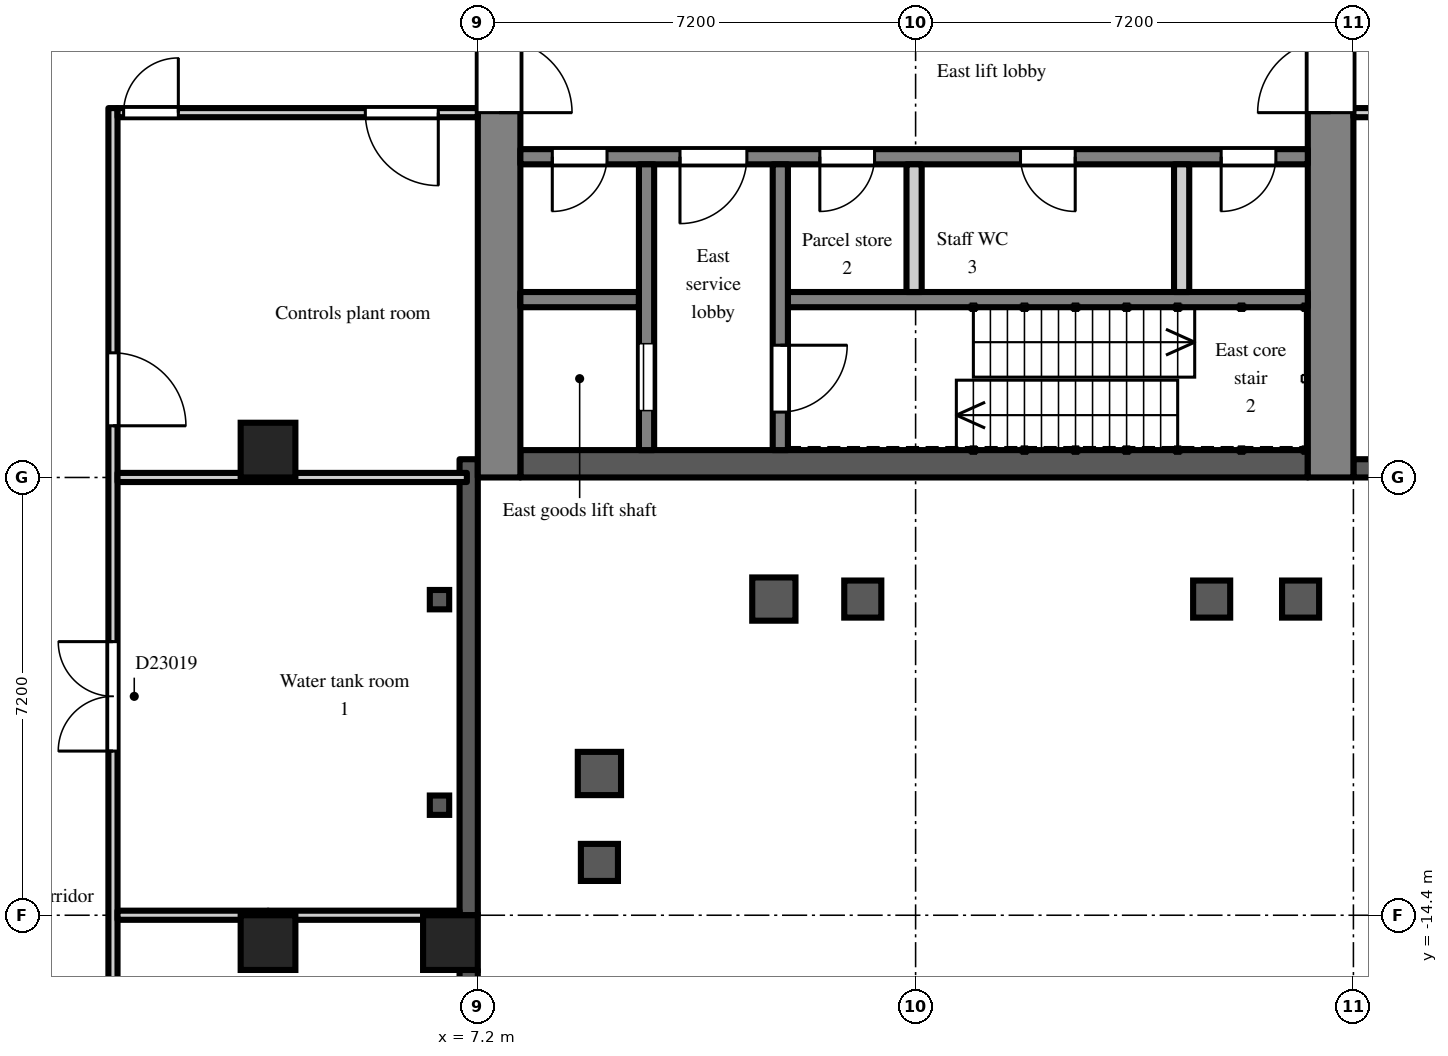
"""IFC4 building model, lengths in metres.
Left out: names, types, materials, properties, quantities, classifications, styles, units other than length and angle.
Written with IfcOpenShell. Run it as: python <this file> out.ifc"""

import sys

from ifc_helpers import new_model, si_unit, direction, frame, frame_2d, origin, origin_2d, place, context, subcontext, project, spatial, polyline, rectangle, outline, extrude, element, fill, save


model = new_model("IFC4")
c1 = context("Model", 3, precision=1e-05, world=origin(), true_north=direction((0.0, 1.0)))
c2 = subcontext(c1, "Body", "Model", "MODEL_VIEW")
j1 = project(units=[si_unit("LENGTHUNIT", "METRE"), si_unit("PLANEANGLEUNIT", "RADIAN")], contexts=[c1])
p1 = place(None, origin())
s1 = spatial("IfcSite", under=j1, at=p1, CompositionType="ELEMENT")
p2 = place(p1, origin())
s2 = spatial("IfcBuilding", under=s1, at=p2, CompositionType="ELEMENT")
p3 = place(p2, frame((0.0, 0.0, 162.3)))
s3 = spatial("IfcBuildingStorey", under=s2, at=p3, CompositionType="ELEMENT", Elevation=162.3)
for number, where, z_axis, x_axis in (
    (1, (3.75, -14.85, 0.0), (0.0, 0.0, 1.0), (1.0, 0.0, 0.0)),
    (2, (3.75, -6.75, 0.0), (0.0, 0.0, 1.0), (1.0, 0.0, 0.0)),
    (3, (6.75, -14.85, 0.0), (0.0, 0.0, 1.0), (1.0, 0.0, 0.0)),
):
    element("IfcColumn", number, at=place(p3, frame(where, z_axis=z_axis, x_axis=x_axis)), inside=s3, PredefinedType="COLUMN", context=c2, shape_type="SweptSolid", body=[
        extrude(rectangle(XDim=0.9, YDim=0.9, at=origin_2d()), origin(), (0.0, 0.0, 1.0), 4.2),
    ])
p4 = place(p3, frame((21.6, -7.05, 0.0), z_axis=(0.0, 0.0, 1.0), x_axis=(1.0, 0.0, 0.0)))
e4 = element("IfcWall", 4, at=p4, inside=s3, PredefinedType="SOLIDWALL", context=c2, shape_type="SweptSolid", body=[
    extrude(rectangle(XDim=2.7, YDim=0.3, at=frame_2d((1.35, 0.0))), origin(), (0.0, 0.0, 1.0), 3.4),
])
p5 = place(p3, frame((7.05, -17.1, 0.0), z_axis=(0.0, 0.0, 1.0), x_axis=(0.0, 1.0, 0.0)))
e5 = element("IfcWall", 5, at=p5, inside=s3, PredefinedType="SOLIDWALL", context=c2, shape_type="SweptSolid", body=[
    extrude(rectangle(XDim=1.8, YDim=0.3, at=frame_2d((0.9, 0.0))), origin(), (0.0, 0.0, 1.0), 3.4),
])
p6 = place(p3, frame((7.05, -14.4, 0.0), z_axis=(0.0, 0.0, 1.0), x_axis=(0.0, 1.0, 0.0)))
e6 = element("IfcWall", 6, at=p6, inside=s3, PredefinedType="SOLIDWALL", context=c2, shape_type="SweptSolid", body=[
    extrude(rectangle(XDim=7.5, YDim=0.3, at=frame_2d((3.75, 0.0))), origin(), (0.0, 0.0, 1.0), 3.8),
])
p7 = place(p3, frame((7.55, -7.2, 0.0), z_axis=(0.0, 0.0, 1.0), x_axis=(0.0, 1.0, 0.0)))
e7 = element("IfcWall", 7, at=p7, inside=s3, PredefinedType="SHEAR", context=c2, shape_type="SweptSolid", body=[
    extrude(rectangle(XDim=14.4, YDim=0.7, at=frame_2d((7.2, 0.0))), origin(), (0.0, 0.0, 1.0), 3.8),
])
p8 = place(p7, frame((6.0, 0.0, 0.0)))
e8 = element("IfcOpeningElement", 8, at=p8, cuts=e7, PredefinedType="OPENING", context=c2, shape_type="SweptSolid", body=[
    extrude(rectangle(XDim=2.4, YDim=2.2, at=frame_2d((1.2, 1.1))), frame((0.0, 0.36, 0.0), z_axis=(0.0, -1.0, 0.0), x_axis=(1.0, 0.0, 0.0)), (0.0, 0.0, 1.0), 0.72),
])
p9 = place(p3, frame((21.225, -7.2, 0.0), z_axis=(0.0, 0.0, 1.0), x_axis=(0.0, 1.0, 0.0)))
e9 = element("IfcWall", 9, at=p9, inside=s3, PredefinedType="SHEAR", context=c2, shape_type="SweptSolid", body=[
    extrude(rectangle(XDim=14.4, YDim=0.75, at=frame_2d((7.2, 0.0))), origin(), (0.0, 0.0, 1.0), 3.8),
])
p10 = place(p9, frame((6.0, 0.0, 0.0)))
e10 = element("IfcOpeningElement", 10, at=p10, cuts=e9, PredefinedType="OPENING", context=c2, shape_type="SweptSolid", body=[
    extrude(rectangle(XDim=2.4, YDim=2.2, at=frame_2d((1.2, 1.1))), frame((0.0, 0.385, 0.0), z_axis=(0.0, -1.0, 0.0), x_axis=(1.0, 0.0, 0.0)), (0.0, 0.0, 1.0), 0.77),
])
p11 = place(p3, frame((7.9, -6.975, 0.0), z_axis=(0.0, 0.0, 1.0), x_axis=(1.0, 0.0, 0.0)))
e11 = element("IfcWall", 11, at=p11, inside=s3, PredefinedType="SHEAR", context=c2, shape_type="SweptSolid", body=[
    extrude(rectangle(XDim=12.95, YDim=0.45, at=frame_2d((6.475, 0.0))), origin(), (0.0, 0.0, 1.0), 3.8),
])
p12 = place(p3, frame((7.9, -1.925, 0.0), z_axis=(0.0, 0.0, 1.0), x_axis=(1.0, 0.0, 0.0)))
e12 = element("IfcWall", 12, at=p12, inside=s3, PredefinedType="SHEAR", context=c2, shape_type="SweptSolid", body=[
    extrude(rectangle(XDim=12.95, YDim=0.25, at=frame_2d((6.475, 0.0))), origin(), (0.0, 0.0, 1.0), 3.8),
])
p13 = place(p12, frame((0.525, 0.0, 0.0)))
e13 = element("IfcOpeningElement", 13, at=p13, cuts=e12, PredefinedType="OPENING", context=c2, shape_type="SweptSolid", body=[
    extrude(rectangle(XDim=0.9, YDim=2.1, at=frame_2d((0.45, 1.05))), frame((0.0, 0.135, 0.0), z_axis=(0.0, -1.0, 0.0), x_axis=(1.0, 0.0, 0.0)), (0.0, 0.0, 1.0), 0.27),
])
p14 = place(p12, frame((2.625, 0.0, 0.0)))
e14 = element("IfcOpeningElement", 14, at=p14, cuts=e12, PredefinedType="OPENING", context=c2, shape_type="SweptSolid", body=[
    extrude(rectangle(XDim=1.1, YDim=2.1, at=frame_2d((0.55, 1.05))), frame((0.0, 0.135, 0.0), z_axis=(0.0, -1.0, 0.0), x_axis=(1.0, 0.0, 0.0)), (0.0, 0.0, 1.0), 0.27),
])
p15 = place(p12, frame((4.925, 0.0, 0.0)))
e15 = element("IfcOpeningElement", 15, at=p15, cuts=e12, PredefinedType="OPENING", context=c2, shape_type="SweptSolid", body=[
    extrude(rectangle(XDim=0.9, YDim=2.1, at=frame_2d((0.45, 1.05))), frame((0.0, 0.135, 0.0), z_axis=(0.0, -1.0, 0.0), x_axis=(1.0, 0.0, 0.0)), (0.0, 0.0, 1.0), 0.27),
])
p16 = place(p12, frame((8.225, 0.0, 0.0)))
e16 = element("IfcOpeningElement", 16, at=p16, cuts=e12, PredefinedType="OPENING", context=c2, shape_type="SweptSolid", body=[
    extrude(rectangle(XDim=0.9, YDim=2.1, at=frame_2d((0.45, 1.05))), frame((0.0, 0.135, 0.0), z_axis=(0.0, -1.0, 0.0), x_axis=(1.0, 0.0, 0.0)), (0.0, 0.0, 1.0), 0.27),
])
p17 = place(p12, frame((11.525, 0.0, 0.0)))
e17 = element("IfcOpeningElement", 17, at=p17, cuts=e12, PredefinedType="OPENING", context=c2, shape_type="SweptSolid", body=[
    extrude(rectangle(XDim=0.9, YDim=2.1, at=frame_2d((0.45, 1.05))), frame((0.0, 0.135, 0.0), z_axis=(0.0, -1.0, 0.0), x_axis=(1.0, 0.0, 0.0)), (0.0, 0.0, 1.0), 0.27),
])
p18 = place(p3, frame((7.9, -4.275, 0.0), z_axis=(0.0, 0.0, 1.0), x_axis=(1.0, 0.0, 0.0)))
e18 = element("IfcWall", 18, at=p18, inside=s3, PredefinedType="SHEAR", context=c2, shape_type="SweptSolid", body=[
    extrude(rectangle(XDim=1.95, YDim=0.25, at=frame_2d((0.975, 0.0))), origin(), (0.0, 0.0, 1.0), 3.8),
])
p19 = place(p3, frame((12.3, -4.275, 0.0), z_axis=(0.0, 0.0, 1.0), x_axis=(1.0, 0.0, 0.0)))
e19 = element("IfcWall", 19, at=p19, inside=s3, PredefinedType="SHEAR", context=c2, shape_type="SweptSolid", body=[
    extrude(rectangle(XDim=8.55, YDim=0.25, at=frame_2d((4.275, 0.0))), origin(), (0.0, 0.0, 1.0), 3.8),
])
p20 = place(p3, frame((9.975, -2.05, 0.0), z_axis=(0.0, 0.0, 1.0), x_axis=(0.0, -1.0, 0.0)))
e20 = element("IfcWall", 20, at=p20, inside=s3, PredefinedType="SHEAR", context=c2, shape_type="SweptSolid", body=[
    extrude(rectangle(XDim=4.7, YDim=0.25, at=frame_2d((2.35, 0.0))), origin(), (0.0, 0.0, 1.0), 3.8),
])
p21 = place(p20, frame((2.95, 0.0, 0.0)))
e21 = element("IfcOpeningElement", 21, at=p21, cuts=e20, PredefinedType="OPENING", context=c2, shape_type="SweptSolid", body=[
    extrude(rectangle(XDim=1.1, YDim=2.1, at=frame_2d((0.55, 1.05))), frame((0.0, 0.135, 0.0), z_axis=(0.0, -1.0, 0.0), x_axis=(1.0, 0.0, 0.0)), (0.0, 0.0, 1.0), 0.27),
])
p22 = place(p3, frame((12.175, -2.05, 0.0), z_axis=(0.0, 0.0, 1.0), x_axis=(0.0, -1.0, 0.0)))
e22 = element("IfcWall", 22, at=p22, inside=s3, PredefinedType="SHEAR", context=c2, shape_type="SweptSolid", body=[
    extrude(rectangle(XDim=4.7, YDim=0.25, at=frame_2d((2.35, 0.0))), origin(), (0.0, 0.0, 1.0), 3.8),
])
p23 = place(p22, frame((2.975, 0.0, 0.0)))
e23 = element("IfcOpeningElement", 23, at=p23, cuts=e22, PredefinedType="OPENING", context=c2, shape_type="SweptSolid", body=[
    extrude(rectangle(XDim=1.1, YDim=2.1, at=frame_2d((0.55, 1.05))), frame((0.0, 0.135, 0.0), z_axis=(0.0, -1.0, 0.0), x_axis=(1.0, 0.0, 0.0)), (0.0, 0.0, 1.0), 0.27),
])
for number, where, z_axis, x_axis in (
    (24, (14.375, -2.05, 0.0), (0.0, 0.0, 1.0), (0.0, -1.0, 0.0)),
    (25, (18.775, -2.05, 0.0), (0.0, 0.0, 1.0), (0.0, -1.0, 0.0)),
):
    element("IfcWall", number, at=place(p3, frame(where, z_axis=z_axis, x_axis=x_axis)), inside=s3, PredefinedType="PARTITIONING", context=c2, shape_type="SweptSolid", body=[
        extrude(rectangle(XDim=2.1, YDim=0.25, at=frame_2d((1.05, 0.0))), origin(), (0.0, 0.0, 1.0), 3.8),
    ])
p24 = place(p3, frame((1.2, -21.42, 0.0), z_axis=(0.0, 0.0, 1.0), x_axis=(0.0, 1.0, 0.0)))
e26 = element("IfcWall", 26, at=p24, inside=s3, PredefinedType="PARTITIONING", context=c2, shape_type="SweptSolid", body=[
    extrude(rectangle(XDim=20.295, YDim=0.15, at=frame_2d((10.147, 0.0))), origin(), (0.0, 0.0, 1.0), 3.8),
])
p25 = place(p24, frame((15.07, 0.0, 0.0)))
e27 = element("IfcOpeningElement", 27, at=p25, cuts=e26, PredefinedType="OPENING", context=c2, shape_type="SweptSolid", body=[
    extrude(rectangle(XDim=1.2, YDim=2.1, at=frame_2d((0.6, 1.05))), frame((0.0, 0.085, 0.0), z_axis=(0.0, -1.0, 0.0), x_axis=(1.0, 0.0, 0.0)), (0.0, 0.0, 1.0), 0.17),
])
p26 = place(p24, frame((9.72, 0.0, 0.0)))
e28 = element("IfcOpeningElement", 28, at=p26, cuts=e26, PredefinedType="OPENING", context=c2, shape_type="SweptSolid", body=[
    extrude(rectangle(XDim=1.8, YDim=2.1, at=frame_2d((0.9, 1.05))), frame((0.0, 0.085, 0.0), z_axis=(0.0, -1.0, 0.0), x_axis=(1.0, 0.0, 0.0)), (0.0, 0.0, 1.0), 0.17),
])
p27 = place(p24, frame((0.97, 0.0, 0.0)))
e29 = element("IfcOpeningElement", 29, at=p27, cuts=e26, PredefinedType="OPENING", context=c2, shape_type="SweptSolid", body=[
    extrude(rectangle(XDim=1.2, YDim=2.1, at=frame_2d((0.6, 1.05))), frame((0.0, 0.085, 0.0), z_axis=(0.0, -1.0, 0.0), x_axis=(1.0, 0.0, 0.0)), (0.0, 0.0, 1.0), 0.17),
])
p28 = place(p24, frame((2.67, 0.0, 0.0)))
e30 = element("IfcOpeningElement", 30, at=p28, cuts=e26, PredefinedType="OPENING", context=c2, shape_type="SweptSolid", body=[
    extrude(rectangle(XDim=1.8, YDim=2.1, at=frame_2d((0.9, 1.05))), frame((0.0, 0.085, 0.0), z_axis=(0.0, -1.0, 0.0), x_axis=(1.0, 0.0, 0.0)), (0.0, 0.0, 1.0), 0.17),
])
for number, where, z_axis, x_axis in (
    (31, (1.275, -14.4, 0.0), (0.0, 0.0, 1.0), (1.0, 0.0, 0.0)),
    (32, (1.275, -7.2, 0.0), (0.0, 0.0, 1.0), (1.0, 0.0, 0.0)),
):
    element("IfcWall", number, at=place(p3, frame(where, z_axis=z_axis, x_axis=x_axis)), inside=s3, PredefinedType="PARTITIONING", context=c2, shape_type="SweptSolid", body=[
        extrude(rectangle(XDim=2.475, YDim=0.15, at=frame_2d((1.238, 0.0))), origin(), (0.0, 0.0, 1.0), 3.8),
    ])
p29 = place(p3, frame((1.275, -1.2, 0.0), z_axis=(0.0, 0.0, 1.0), x_axis=(1.0, 0.0, 0.0)))
e33 = element("IfcWall", 33, at=p29, inside=s3, PredefinedType="PARTITIONING", context=c2, shape_type="SweptSolid", body=[
    extrude(rectangle(XDim=5.925, YDim=0.15, at=frame_2d((2.962, 0.0))), origin(), (0.0, 0.0, 1.0), 3.8),
])
p30 = place(p29, frame((0.1, 0.0, 0.0)))
e34 = element("IfcOpeningElement", 34, at=p30, cuts=e33, PredefinedType="OPENING", context=c2, shape_type="SweptSolid", body=[
    extrude(rectangle(XDim=0.9, YDim=2.1, at=frame_2d((0.45, 1.05))), frame((0.0, 0.085, 0.0), z_axis=(0.0, -1.0, 0.0), x_axis=(1.0, 0.0, 0.0)), (0.0, 0.0, 1.0), 0.17),
])
p31 = place(p29, frame((4.075, 0.0, 0.0)))
e35 = element("IfcOpeningElement", 35, at=p31, cuts=e33, PredefinedType="OPENING", context=c2, shape_type="SweptSolid", body=[
    extrude(rectangle(XDim=1.2, YDim=2.1, at=frame_2d((0.6, 1.05))), frame((0.0, 0.085, 0.0), z_axis=(0.0, -1.0, 0.0), x_axis=(1.0, 0.0, 0.0)), (0.0, 0.0, 1.0), 0.17),
])
p32 = place(p3, frame((21.6, -1.2, 0.0), z_axis=(0.0, 0.0, 1.0), x_axis=(1.0, 0.0, 0.0)))
e36 = element("IfcWall", 36, at=p32, inside=s3, PredefinedType="PARTITIONING", context=c2, shape_type="SweptSolid", body=[
    extrude(outline(polyline([(0.0, 0.0), (14.9, 0.0), (14.9, 3.8), (9.602, 3.8), (9.6, 3.4), (8.8, 3.4), (8.798, 3.8), (0.0, 3.8), (0.0, 0.0)])), frame((0.0, 0.075, 0.0), z_axis=(0.0, -1.0, 0.0), x_axis=(1.0, 0.0, 0.0)), (0.0, 0.0, 1.0), 0.15),
])
p33 = place(p32, frame((1.2, 0.0, 0.0)))
e37 = element("IfcOpeningElement", 37, at=p33, cuts=e36, PredefinedType="OPENING", context=c2, shape_type="SweptSolid", body=[
    extrude(rectangle(XDim=1.2, YDim=2.1, at=frame_2d((0.6, 1.05))), frame((0.0, 0.085, 0.0), z_axis=(0.0, -1.0, 0.0), x_axis=(1.0, 0.0, 0.0)), (0.0, 0.0, 1.0), 0.17),
])
p34 = place(p32, frame((9.25, 0.0, 0.0)))
e38 = element("IfcOpeningElement", 38, at=p34, cuts=e36, PredefinedType="OPENING", context=c2, shape_type="SweptSolid", body=[
    extrude(rectangle(XDim=0.9, YDim=2.1, at=frame_2d((0.45, 1.05))), frame((0.0, 0.085, 0.0), z_axis=(0.0, -1.0, 0.0), x_axis=(1.0, 0.0, 0.0)), (0.0, 0.0, 1.0), 0.17),
])
p35 = place(p32, frame((12.25, 0.0, 0.0)))
e39 = element("IfcOpeningElement", 39, at=p35, cuts=e36, PredefinedType="OPENING", context=c2, shape_type="SweptSolid", body=[
    extrude(rectangle(XDim=1.2, YDim=2.1, at=frame_2d((0.6, 1.05))), frame((0.0, 0.085, 0.0), z_axis=(0.0, -1.0, 0.0), x_axis=(1.0, 0.0, 0.0)), (0.0, 0.0, 1.0), 0.17),
])
p36 = place(p3, frame((3.75, -14.4, 0.0), z_axis=(0.0, 0.0, 1.0), x_axis=(1.0, 0.0, 0.0)))
e40 = element("IfcWall", 40, at=p36, inside=s3, PredefinedType="PARTITIONING", context=c2, shape_type="SweptSolid", body=[
    extrude(rectangle(XDim=3.15, YDim=0.15, at=frame_2d((1.575, 0.0))), origin(), (0.0, 0.0, 1.0), 3.4),
])
p37 = place(p3, frame((3.75, -7.2, 0.0), z_axis=(0.0, 0.0, 1.0), x_axis=(1.0, 0.0, 0.0)))
e41 = element("IfcWall", 41, at=p37, inside=s3, PredefinedType="PARTITIONING", context=c2, shape_type="SweptSolid", body=[
    extrude(rectangle(XDim=3.27, YDim=0.15, at=frame_2d((1.635, 0.0))), origin(), (0.0, 0.0, 1.0), 3.4),
])
p38 = place(p21, origin())
e42 = element("IfcDoor", 42, at=p38, inside=s3, OperationType="SLIDING_TO_LEFT", PredefinedType="DOOR", context=c2, shape_type="SweptSolid", body=[
    extrude(rectangle(XDim=1.1, YDim=2.1, at=frame_2d((0.55, 1.05))), frame((0.0, 0.025, 0.0), z_axis=(0.0, -1.0, 0.0), x_axis=(1.0, 0.0, 0.0)), (0.0, 0.0, 1.0), 0.05),
])
fill(e21, e42)
p39 = place(p23, origin())
e43 = element("IfcDoor", 43, at=p39, inside=s3, OperationType="SINGLE_SWING_LEFT", PredefinedType="DOOR", context=c2, shape_type="SweptSolid", body=[
    extrude(rectangle(XDim=1.1, YDim=2.1, at=frame_2d((0.55, 1.05))), frame((0.0, 0.025, 0.0), z_axis=(0.0, -1.0, 0.0), x_axis=(1.0, 0.0, 0.0)), (0.0, 0.0, 1.0), 0.05),
])
fill(e23, e43)
p40 = place(p13, frame((0.9, 0.0, 0.0), z_axis=(0.0, 0.0, 1.0), x_axis=(-1.0, 0.0, 0.0)))
e44 = element("IfcDoor", 44, at=p40, inside=s3, OperationType="SINGLE_SWING_RIGHT", PredefinedType="DOOR", context=c2, shape_type="SweptSolid", body=[
    extrude(rectangle(XDim=0.9, YDim=2.1, at=frame_2d((0.45, 1.05))), frame((0.0, 0.025, 0.0), z_axis=(0.0, -1.0, 0.0), x_axis=(1.0, 0.0, 0.0)), (0.0, 0.0, 1.0), 0.05),
])
fill(e13, e44)
p41 = place(p14, frame((1.1, 0.0, 0.0), z_axis=(0.0, 0.0, 1.0), x_axis=(-1.0, 0.0, 0.0)))
e45 = element("IfcDoor", 45, at=p41, inside=s3, OperationType="SINGLE_SWING_RIGHT", PredefinedType="DOOR", context=c2, shape_type="SweptSolid", body=[
    extrude(rectangle(XDim=1.1, YDim=2.1, at=frame_2d((0.55, 1.05))), frame((0.0, 0.025, 0.0), z_axis=(0.0, -1.0, 0.0), x_axis=(1.0, 0.0, 0.0)), (0.0, 0.0, 1.0), 0.05),
])
fill(e14, e45)
p42 = place(p8, frame((2.4, 0.0, 0.0), z_axis=(0.0, 0.0, 1.0), x_axis=(-1.0, 0.0, 0.0)))
e46 = element("IfcDoor", 46, at=p42, inside=s3, OperationType="DOUBLE_DOOR_DOUBLE_SWING", PredefinedType="DOOR", context=c2, shape_type="SweptSolid", body=[
    extrude(rectangle(XDim=2.4, YDim=2.2, at=frame_2d((1.2, 1.1))), frame((0.0, 0.025, 0.0), z_axis=(0.0, -1.0, 0.0), x_axis=(1.0, 0.0, 0.0)), (0.0, 0.0, 1.0), 0.05),
])
fill(e8, e46)
p43 = place(p10, origin())
e47 = element("IfcDoor", 47, at=p43, inside=s3, OperationType="DOUBLE_DOOR_DOUBLE_SWING", PredefinedType="DOOR", context=c2, shape_type="SweptSolid", body=[
    extrude(rectangle(XDim=2.4, YDim=2.2, at=frame_2d((1.2, 1.1))), frame((0.0, 0.025, 0.0), z_axis=(0.0, -1.0, 0.0), x_axis=(1.0, 0.0, 0.0)), (0.0, 0.0, 1.0), 0.05),
])
fill(e10, e47)
p44 = place(p15, frame((0.9, 0.0, 0.0), z_axis=(0.0, 0.0, 1.0), x_axis=(-1.0, 0.0, 0.0)))
e48 = element("IfcDoor", 48, at=p44, inside=s3, OperationType="SINGLE_SWING_RIGHT", PredefinedType="DOOR", context=c2, shape_type="SweptSolid", body=[
    extrude(rectangle(XDim=0.9, YDim=2.1, at=frame_2d((0.45, 1.05))), frame((0.0, 0.025, 0.0), z_axis=(0.0, -1.0, 0.0), x_axis=(1.0, 0.0, 0.0)), (0.0, 0.0, 1.0), 0.05),
])
fill(e15, e48)
p45 = place(p16, frame((0.9, 0.0, 0.0), z_axis=(0.0, 0.0, 1.0), x_axis=(-1.0, 0.0, 0.0)))
e49 = element("IfcDoor", 49, at=p45, inside=s3, OperationType="SINGLE_SWING_LEFT", PredefinedType="DOOR", context=c2, shape_type="SweptSolid", body=[
    extrude(rectangle(XDim=0.9, YDim=2.1, at=frame_2d((0.45, 1.05))), frame((0.0, 0.025, 0.0), z_axis=(0.0, -1.0, 0.0), x_axis=(1.0, 0.0, 0.0)), (0.0, 0.0, 1.0), 0.05),
])
fill(e16, e49)
p46 = place(p17, frame((0.9, 0.0, 0.0), z_axis=(0.0, 0.0, 1.0), x_axis=(-1.0, 0.0, 0.0)))
e50 = element("IfcDoor", 50, at=p46, inside=s3, OperationType="SINGLE_SWING_RIGHT", PredefinedType="DOOR", context=c2, shape_type="SweptSolid", body=[
    extrude(rectangle(XDim=0.9, YDim=2.1, at=frame_2d((0.45, 1.05))), frame((0.0, 0.025, 0.0), z_axis=(0.0, -1.0, 0.0), x_axis=(1.0, 0.0, 0.0)), (0.0, 0.0, 1.0), 0.05),
])
fill(e17, e50)
p47 = place(p25, frame((1.2, 0.0, 0.0), z_axis=(0.0, 0.0, 1.0), x_axis=(-1.0, 0.0, 0.0)))
e51 = element("IfcDoor", 51, at=p47, inside=s3, OperationType="SINGLE_SWING_RIGHT", PredefinedType="DOOR", context=c2, shape_type="SweptSolid", body=[
    extrude(rectangle(XDim=1.2, YDim=2.1, at=frame_2d((0.6, 1.05))), frame((0.0, 0.025, 0.0), z_axis=(0.0, -1.0, 0.0), x_axis=(1.0, 0.0, 0.0)), (0.0, 0.0, 1.0), 0.05),
])
fill(e27, e51)
p48 = place(p30, origin())
e52 = element("IfcDoor", 52, at=p48, inside=s3, OperationType="SINGLE_SWING_RIGHT", PredefinedType="DOOR", context=c2, shape_type="SweptSolid", body=[
    extrude(rectangle(XDim=0.9, YDim=2.1, at=frame_2d((0.45, 1.05))), frame((0.0, 0.025, 0.0), z_axis=(0.0, -1.0, 0.0), x_axis=(1.0, 0.0, 0.0)), (0.0, 0.0, 1.0), 0.05),
])
fill(e34, e52)
p49 = place(p31, frame((1.2, 0.0, 0.0), z_axis=(0.0, 0.0, 1.0), x_axis=(-1.0, 0.0, 0.0)))
e53 = element("IfcDoor", 53, at=p49, inside=s3, OperationType="SINGLE_SWING_LEFT", PredefinedType="DOOR", context=c2, shape_type="SweptSolid", body=[
    extrude(rectangle(XDim=1.2, YDim=2.1, at=frame_2d((0.6, 1.05))), frame((0.0, 0.025, 0.0), z_axis=(0.0, -1.0, 0.0), x_axis=(1.0, 0.0, 0.0)), (0.0, 0.0, 1.0), 0.05),
])
fill(e35, e53)
p50 = place(p26, origin())
e54 = element("IfcDoor", 54, at=p50, inside=s3, OperationType="DOUBLE_DOOR_DOUBLE_SWING", PredefinedType="DOOR", context=c2, shape_type="SweptSolid", body=[
    extrude(rectangle(XDim=1.8, YDim=2.1, at=frame_2d((0.9, 1.05))), frame((0.0, 0.025, 0.0), z_axis=(0.0, -1.0, 0.0), x_axis=(1.0, 0.0, 0.0)), (0.0, 0.0, 1.0), 0.05),
])
fill(e28, e54)
save(model, sys.argv[1])
